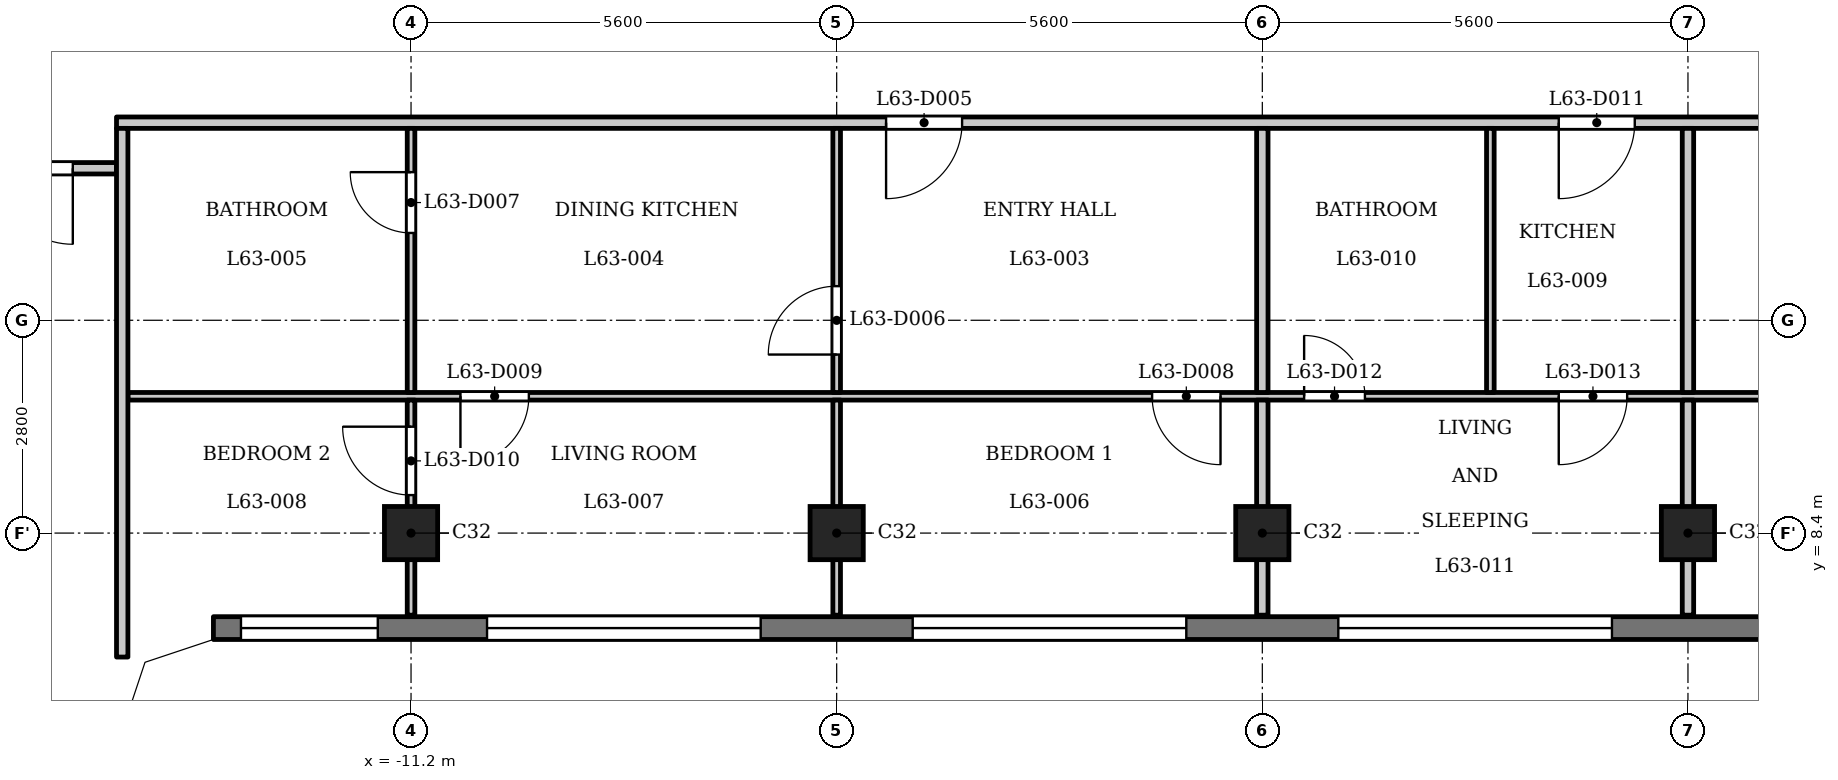
"""IFC4 building model, lengths in metres.
Left out: names, types, materials, properties, quantities, classifications, styles, units other than length and angle.
Written with IfcOpenShell. Run it as: python <this file> out.ifc"""

import sys

from ifc_helpers import new_model, si_unit, direction, frame, frame_2d, origin, origin_2d, place, context, subcontext, project, spatial, polyline, rectangle, outline, extrude, element, fill, save


model = new_model("IFC4")
c1 = context("Model", 3, precision=1e-05, world=origin(), true_north=direction((0.0, 1.0)))
c2 = subcontext(c1, "Body", "Model", "MODEL_VIEW")
j1 = project(units=[si_unit("LENGTHUNIT", "METRE"), si_unit("PLANEANGLEUNIT", "RADIAN")], contexts=[c1])
p1 = place(None, origin())
s1 = spatial("IfcSite", under=j1, at=p1, CompositionType="ELEMENT")
p2 = place(p1, origin())
s2 = spatial("IfcBuilding", under=s1, at=p2, CompositionType="ELEMENT")
p3 = place(p2, frame((0.0, 0.0, 245.2)))
s3 = spatial("IfcBuildingStorey", under=s2, at=p3, CompositionType="ELEMENT", Elevation=245.2)
for number, where, z_axis, x_axis in (
    (1, (-11.2, 8.4, 0.0), (0.0, 0.0, 1.0), (1.0, 0.0, 0.0)),
    (2, (-5.6, 8.4, 0.0), (0.0, 0.0, 1.0), (1.0, 0.0, 0.0)),
    (3, (0.0, 8.4, 0.0), (0.0, 0.0, 1.0), (1.0, 0.0, 0.0)),
    (4, (5.6, 8.4, 0.0), (0.0, 0.0, 1.0), (1.0, 0.0, 0.0)),
):
    element("IfcColumn", number, at=place(p3, frame(where, z_axis=z_axis, x_axis=x_axis)), inside=s3, PredefinedType="COLUMN", context=c2, shape_type="SweptSolid", body=[
        extrude(rectangle(XDim=0.7, YDim=0.7, at=origin_2d()), origin(), (0.0, 0.0, 1.0), 3.5),
    ])
p4 = place(p3, frame((-13.8, 7.15, 0.0), z_axis=(0.0, 0.0, 1.0), x_axis=(1.0, 0.0, 0.0)))
e5 = element("IfcWall", 5, at=p4, inside=s3, PredefinedType="SOLIDWALL", context=c2, shape_type="SweptSolid", body=[
    extrude(rectangle(XDim=27.6, YDim=0.3, at=frame_2d((13.8, 0.0))), origin(), (0.0, 0.0, 1.0), 3.2),
])
p5 = place(p4, frame((0.363, 0.0, 0.9)))
e6 = element("IfcOpeningElement", 6, at=p5, cuts=e5, PredefinedType="OPENING", context=c2, shape_type="SweptSolid", body=[
    extrude(rectangle(XDim=1.8, YDim=1.25, at=frame_2d((0.9, 0.625))), frame((0.0, 0.16, 0.0), z_axis=(0.0, -1.0, 0.0), x_axis=(1.0, 0.0, 0.0)), (0.0, 0.0, 1.0), 0.32),
])
p6 = place(p4, frame((3.6, 0.0, 1.2)))
e7 = element("IfcOpeningElement", 7, at=p6, cuts=e5, PredefinedType="OPENING", context=c2, shape_type="SweptSolid", body=[
    extrude(rectangle(XDim=3.6, YDim=0.95, at=frame_2d((1.8, 0.475))), frame((0.0, 0.16, 0.0), z_axis=(0.0, -1.0, 0.0), x_axis=(1.0, 0.0, 0.0)), (0.0, 0.0, 1.0), 0.32),
])
p7 = place(p4, frame((9.2, 0.0, 1.2)))
e8 = element("IfcOpeningElement", 8, at=p7, cuts=e5, PredefinedType="OPENING", context=c2, shape_type="SweptSolid", body=[
    extrude(rectangle(XDim=3.6, YDim=0.95, at=frame_2d((1.8, 0.475))), frame((0.0, 0.16, 0.0), z_axis=(0.0, -1.0, 0.0), x_axis=(1.0, 0.0, 0.0)), (0.0, 0.0, 1.0), 0.32),
])
p8 = place(p4, frame((14.8, 0.0, 1.2)))
e9 = element("IfcOpeningElement", 9, at=p8, cuts=e5, PredefinedType="OPENING", context=c2, shape_type="SweptSolid", body=[
    extrude(rectangle(XDim=3.6, YDim=0.95, at=frame_2d((1.8, 0.475))), frame((0.0, 0.16, 0.0), z_axis=(0.0, -1.0, 0.0), x_axis=(1.0, 0.0, 0.0)), (0.0, 0.0, 1.0), 0.32),
])
p9 = place(p4, frame((20.4, 0.0, 1.2)))
e10 = element("IfcOpeningElement", 10, at=p9, cuts=e5, PredefinedType="OPENING", context=c2, shape_type="SweptSolid", body=[
    extrude(rectangle(XDim=3.6, YDim=0.95, at=frame_2d((1.8, 0.475))), frame((0.0, 0.16, 0.0), z_axis=(0.0, -1.0, 0.0), x_axis=(1.0, 0.0, 0.0)), (0.0, 0.0, 1.0), 0.32),
])
p10 = place(p4, frame((25.438, 0.0, 0.9)))
e11 = element("IfcOpeningElement", 11, at=p10, cuts=e5, PredefinedType="OPENING", context=c2, shape_type="SweptSolid", body=[
    extrude(rectangle(XDim=1.8, YDim=1.25, at=frame_2d((0.9, 0.625))), frame((0.0, 0.16, 0.0), z_axis=(0.0, -1.0, 0.0), x_axis=(1.0, 0.0, 0.0)), (0.0, 0.0, 1.0), 0.32),
])
p11 = place(p3, frame((-14.925, 10.2, 0.0), z_axis=(0.0, 0.0, 1.0), x_axis=(1.0, 0.0, 0.0)))
e12 = element("IfcWall", 12, at=p11, inside=s3, PredefinedType="PARTITIONING", context=c2, shape_type="SweptSolid", body=[
    extrude(rectangle(XDim=29.85, YDim=0.1, at=frame_2d((14.925, 0.0))), origin(), (0.0, 0.0, 1.0), 3.2),
])
p12 = place(p11, frame((13.475, 0.0, 0.0)))
e13 = element("IfcOpeningElement", 13, at=p12, cuts=e12, PredefinedType="OPENING", context=c2, shape_type="SweptSolid", body=[
    extrude(rectangle(XDim=0.9, YDim=2.1, at=frame_2d((0.45, 1.05))), frame((0.0, 0.06, 0.0), z_axis=(0.0, -1.0, 0.0), x_axis=(1.0, 0.0, 0.0)), (0.0, 0.0, 1.0), 0.12),
])
p13 = place(p11, frame((4.375, 0.0, 0.0)))
e14 = element("IfcOpeningElement", 14, at=p13, cuts=e12, PredefinedType="OPENING", context=c2, shape_type="SweptSolid", body=[
    extrude(rectangle(XDim=0.9, YDim=2.1, at=frame_2d((0.45, 1.05))), frame((0.0, 0.06, 0.0), z_axis=(0.0, -1.0, 0.0), x_axis=(1.0, 0.0, 0.0)), (0.0, 0.0, 1.0), 0.12),
])
p14 = place(p11, frame((15.475, 0.0, 0.0)))
e15 = element("IfcOpeningElement", 15, at=p14, cuts=e12, PredefinedType="OPENING", context=c2, shape_type="SweptSolid", body=[
    extrude(rectangle(XDim=0.8, YDim=2.1, at=frame_2d((0.4, 1.05))), frame((0.0, 0.06, 0.0), z_axis=(0.0, -1.0, 0.0), x_axis=(1.0, 0.0, 0.0)), (0.0, 0.0, 1.0), 0.12),
])
p15 = place(p11, frame((18.825, 0.0, 0.0)))
e16 = element("IfcOpeningElement", 16, at=p15, cuts=e12, PredefinedType="OPENING", context=c2, shape_type="SweptSolid", body=[
    extrude(rectangle(XDim=0.9, YDim=2.1, at=frame_2d((0.45, 1.05))), frame((0.0, 0.06, 0.0), z_axis=(0.0, -1.0, 0.0), x_axis=(1.0, 0.0, 0.0)), (0.0, 0.0, 1.0), 0.12),
])
p16 = place(p11, frame((28.474, 0.0, 0.0)))
e17 = element("IfcOpeningElement", 17, at=p16, cuts=e12, PredefinedType="OPENING", context=c2, shape_type="SweptSolid", body=[
    extrude(rectangle(XDim=0.8, YDim=2.1, at=frame_2d((0.4, 1.05))), frame((0.0, 0.06, 0.0), z_axis=(0.0, -1.0, 0.0), x_axis=(1.0, 0.0, 0.0)), (0.0, 0.0, 1.0), 0.12),
])
p17 = place(p11, frame((24.675, 0.0, 0.0)))
e18 = element("IfcOpeningElement", 18, at=p17, cuts=e12, PredefinedType="OPENING", context=c2, shape_type="SweptSolid", body=[
    extrude(rectangle(XDim=0.9, YDim=2.1, at=frame_2d((0.45, 1.05))), frame((0.0, 0.06, 0.0), z_axis=(0.0, -1.0, 0.0), x_axis=(1.0, 0.0, 0.0)), (0.0, 0.0, 1.0), 0.12),
])
p18 = place(p3, frame((-17.4, 13.2, 0.0), z_axis=(0.0, 0.0, 1.0), x_axis=(1.0, 0.0, 0.0)))
e19 = element("IfcWall", 19, at=p18, inside=s3, PredefinedType="PARTITIONING", context=c2, shape_type="SweptSolid", body=[
    extrude(rectangle(XDim=2.325, YDim=0.15, at=frame_2d((1.163, 0.0))), origin(), (0.0, 0.0, 1.0), 3.2),
])
p19 = place(p18, frame((0.75, 0.0, 0.0)))
e20 = element("IfcOpeningElement", 20, at=p19, cuts=e19, PredefinedType="OPENING", context=c2, shape_type="SweptSolid", body=[
    extrude(rectangle(XDim=1.0, YDim=2.1, at=frame_2d((0.5, 1.05))), frame((0.0, 0.085, 0.0), z_axis=(0.0, -1.0, 0.0), x_axis=(1.0, 0.0, 0.0)), (0.0, 0.0, 1.0), 0.17),
])
p20 = place(p3, frame((-15.075, 13.8, 0.0), z_axis=(0.0, 0.0, 1.0), x_axis=(1.0, 0.0, 0.0)))
e21 = element("IfcWall", 21, at=p20, inside=s3, PredefinedType="PARTITIONING", context=c2, shape_type="SweptSolid", body=[
    extrude(rectangle(XDim=30.15, YDim=0.15, at=frame_2d((15.075, 0.0))), origin(), (0.0, 0.0, 1.0), 3.2),
])
p21 = place(p20, frame((10.125, 0.0, 0.0)))
e22 = element("IfcOpeningElement", 22, at=p21, cuts=e21, PredefinedType="OPENING", context=c2, shape_type="SweptSolid", body=[
    extrude(rectangle(XDim=1.0, YDim=2.1, at=frame_2d((0.5, 1.05))), frame((0.0, 0.085, 0.0), z_axis=(0.0, -1.0, 0.0), x_axis=(1.0, 0.0, 0.0)), (0.0, 0.0, 1.0), 0.17),
])
p22 = place(p20, frame((18.975, 0.0, 0.0)))
e23 = element("IfcOpeningElement", 23, at=p22, cuts=e21, PredefinedType="OPENING", context=c2, shape_type="SweptSolid", body=[
    extrude(rectangle(XDim=1.0, YDim=2.1, at=frame_2d((0.5, 1.05))), frame((0.0, 0.085, 0.0), z_axis=(0.0, -1.0, 0.0), x_axis=(1.0, 0.0, 0.0)), (0.0, 0.0, 1.0), 0.17),
])
p23 = place(p20, frame((24.575, 0.0, 0.0)))
e24 = element("IfcOpeningElement", 24, at=p23, cuts=e21, PredefinedType="OPENING", context=c2, shape_type="SweptSolid", body=[
    extrude(rectangle(XDim=1.0, YDim=2.1, at=frame_2d((0.5, 1.05))), frame((0.0, 0.085, 0.0), z_axis=(0.0, -1.0, 0.0), x_axis=(1.0, 0.0, 0.0)), (0.0, 0.0, 1.0), 0.17),
])
p24 = place(p3, frame((-15.0, 6.769, 0.0), z_axis=(0.0, 0.0, 1.0), x_axis=(0.0, 1.0, 0.0)))
e25 = element("IfcWall", 25, at=p24, inside=s3, PredefinedType="PARTITIONING", context=c2, shape_type="SweptSolid", body=[
    extrude(rectangle(XDim=6.956, YDim=0.15, at=frame_2d((3.478, 0.0))), origin(), (0.0, 0.0, 1.0), 3.2),
])
p25 = place(p3, frame((-11.2, 7.32, 0.0), z_axis=(0.0, 0.0, 1.0), x_axis=(0.0, 1.0, 0.0)))
e26 = element("IfcWall", 26, at=p25, inside=s3, PredefinedType="PARTITIONING", context=c2, shape_type="SweptSolid", body=[
    extrude(rectangle(XDim=2.83, YDim=0.1, at=frame_2d((1.415, 0.0))), origin(), (0.0, 0.0, 1.0), 3.2),
])
p26 = place(p25, frame((1.58, 0.0, 0.0)))
e27 = element("IfcOpeningElement", 27, at=p26, cuts=e26, PredefinedType="OPENING", context=c2, shape_type="SweptSolid", body=[
    extrude(rectangle(XDim=0.9, YDim=2.1, at=frame_2d((0.45, 1.05))), frame((0.0, 0.06, 0.0), z_axis=(0.0, -1.0, 0.0), x_axis=(1.0, 0.0, 0.0)), (0.0, 0.0, 1.0), 0.12),
])
p27 = place(p3, frame((-11.2, 10.25, 0.0), z_axis=(0.0, 0.0, 1.0), x_axis=(0.0, 1.0, 0.0)))
e28 = element("IfcWall", 28, at=p27, inside=s3, PredefinedType="PARTITIONING", context=c2, shape_type="SweptSolid", body=[
    extrude(rectangle(XDim=3.475, YDim=0.1, at=frame_2d((1.738, 0.0))), origin(), (0.0, 0.0, 1.0), 3.2),
])
p28 = place(p27, frame((2.099, 0.0, 0.0)))
e29 = element("IfcOpeningElement", 29, at=p28, cuts=e28, PredefinedType="OPENING", context=c2, shape_type="SweptSolid", body=[
    extrude(rectangle(XDim=0.8, YDim=2.1, at=frame_2d((0.4, 1.05))), frame((0.0, 0.06, 0.0), z_axis=(0.0, -1.0, 0.0), x_axis=(1.0, 0.0, 0.0)), (0.0, 0.0, 1.0), 0.12),
])
p29 = place(p3, frame((-5.6, 7.32, 0.0), z_axis=(0.0, 0.0, 1.0), x_axis=(0.0, 1.0, 0.0)))
e30 = element("IfcWall", 30, at=p29, inside=s3, PredefinedType="PARTITIONING", context=c2, shape_type="SweptSolid", body=[
    extrude(rectangle(XDim=2.83, YDim=0.1, at=frame_2d((1.415, 0.0))), origin(), (0.0, 0.0, 1.0), 3.2),
])
p30 = place(p3, frame((-5.6, 10.25, 0.0), z_axis=(0.0, 0.0, 1.0), x_axis=(0.0, 1.0, 0.0)))
e31 = element("IfcWall", 31, at=p30, inside=s3, PredefinedType="PARTITIONING", context=c2, shape_type="SweptSolid", body=[
    extrude(rectangle(XDim=3.475, YDim=0.1, at=frame_2d((1.738, 0.0))), origin(), (0.0, 0.0, 1.0), 3.2),
])
p31 = place(p30, frame((0.499, 0.0, 0.0)))
e32 = element("IfcOpeningElement", 32, at=p31, cuts=e31, PredefinedType="OPENING", context=c2, shape_type="SweptSolid", body=[
    extrude(rectangle(XDim=0.9, YDim=2.1, at=frame_2d((0.45, 1.05))), frame((0.0, 0.06, 0.0), z_axis=(0.0, -1.0, 0.0), x_axis=(1.0, 0.0, 0.0)), (0.0, 0.0, 1.0), 0.12),
])
p32 = place(p3, frame((0.0, 7.32, 0.0), z_axis=(0.0, 0.0, 1.0), x_axis=(0.0, 1.0, 0.0)))
e33 = element("IfcWall", 33, at=p32, inside=s3, PredefinedType="PARTITIONING", context=c2, shape_type="SweptSolid", body=[
    extrude(rectangle(XDim=2.83, YDim=0.15, at=frame_2d((1.415, 0.0))), origin(), (0.0, 0.0, 1.0), 3.2),
])
p33 = place(p3, frame((0.0, 10.25, 0.0), z_axis=(0.0, 0.0, 1.0), x_axis=(0.0, 1.0, 0.0)))
e34 = element("IfcWall", 34, at=p33, inside=s3, PredefinedType="PARTITIONING", context=c2, shape_type="SweptSolid", body=[
    extrude(rectangle(XDim=3.475, YDim=0.15, at=frame_2d((1.738, 0.0))), origin(), (0.0, 0.0, 1.0), 3.2),
])
p34 = place(p3, frame((3.0, 10.25, 0.0), z_axis=(0.0, 0.0, 1.0), x_axis=(0.0, 1.0, 0.0)))
e35 = element("IfcWall", 35, at=p34, inside=s3, PredefinedType="PARTITIONING", context=c2, shape_type="SweptSolid", body=[
    extrude(rectangle(XDim=3.475, YDim=0.1, at=frame_2d((1.738, 0.0))), origin(), (0.0, 0.0, 1.0), 3.2),
])
p35 = place(p3, frame((5.6, 7.32, 0.0), z_axis=(0.0, 0.0, 1.0), x_axis=(0.0, 1.0, 0.0)))
e36 = element("IfcWall", 36, at=p35, inside=s3, PredefinedType="PARTITIONING", context=c2, shape_type="SweptSolid", body=[
    extrude(rectangle(XDim=2.83, YDim=0.15, at=frame_2d((1.415, 0.0))), origin(), (0.0, 0.0, 1.0), 3.2),
])
p36 = place(p3, frame((5.6, 10.25, 0.0), z_axis=(0.0, 0.0, 1.0), x_axis=(0.0, 1.0, 0.0)))
e37 = element("IfcWall", 37, at=p36, inside=s3, PredefinedType="PARTITIONING", context=c2, shape_type="SweptSolid", body=[
    extrude(rectangle(XDim=3.475, YDim=0.15, at=frame_2d((1.738, 0.0))), origin(), (0.0, 0.0, 1.0), 3.2),
])
p37 = place(p3, origin())
e38 = element("IfcWall", 38, at=p37, inside=s3, PredefinedType="SOLIDWALL", context=c2, shape_type="SweptSolid", body=[
    extrude(outline(polyline([(-13.849, 7.3), (-14.937, 6.937), (-15.3, 5.849), (-15.3, 5.8), (-15.0, 5.8), (-14.7, 6.7), (-13.8, 7.0), (-13.8, 7.3), (-13.849, 7.3)])), origin(), (0.0, 0.0, 1.0), 3.2),
])
p38 = place(p19, origin())
e39 = element("IfcDoor", 39, at=p38, inside=s3, OperationType="SINGLE_SWING_RIGHT", PredefinedType="DOOR", context=c2, shape_type="SweptSolid", body=[
    extrude(rectangle(XDim=1.0, YDim=2.1, at=frame_2d((0.5, 1.05))), frame((0.0, 0.025, 0.0), z_axis=(0.0, -1.0, 0.0), x_axis=(1.0, 0.0, 0.0)), (0.0, 0.0, 1.0), 0.05),
])
fill(e20, e39)
p39 = place(p21, origin())
e40 = element("IfcDoor", 40, at=p39, inside=s3, OperationType="SINGLE_SWING_LEFT", PredefinedType="DOOR", context=c2, shape_type="SweptSolid", body=[
    extrude(rectangle(XDim=1.0, YDim=2.1, at=frame_2d((0.5, 1.05))), frame((0.0, 0.025, 0.0), z_axis=(0.0, -1.0, 0.0), x_axis=(1.0, 0.0, 0.0)), (0.0, 0.0, 1.0), 0.05),
])
fill(e22, e40)
p40 = place(p31, origin())
e41 = element("IfcDoor", 41, at=p40, inside=s3, OperationType="SINGLE_SWING_RIGHT", PredefinedType="DOOR", context=c2, shape_type="SweptSolid", body=[
    extrude(rectangle(XDim=0.9, YDim=2.1, at=frame_2d((0.45, 1.05))), frame((0.0, 0.025, 0.0), z_axis=(0.0, -1.0, 0.0), x_axis=(1.0, 0.0, 0.0)), (0.0, 0.0, 1.0), 0.05),
])
fill(e32, e41)
p41 = place(p28, origin())
e42 = element("IfcDoor", 42, at=p41, inside=s3, OperationType="SINGLE_SWING_LEFT", PredefinedType="DOOR", context=c2, shape_type="SweptSolid", body=[
    extrude(rectangle(XDim=0.8, YDim=2.1, at=frame_2d((0.4, 1.05))), frame((0.0, 0.025, 0.0), z_axis=(0.0, -1.0, 0.0), x_axis=(1.0, 0.0, 0.0)), (0.0, 0.0, 1.0), 0.05),
])
fill(e29, e42)
p42 = place(p12, origin())
e43 = element("IfcDoor", 43, at=p42, inside=s3, OperationType="SINGLE_SWING_RIGHT", PredefinedType="DOOR", context=c2, shape_type="SweptSolid", body=[
    extrude(rectangle(XDim=0.9, YDim=2.1, at=frame_2d((0.45, 1.05))), frame((0.0, 0.025, 0.0), z_axis=(0.0, -1.0, 0.0), x_axis=(1.0, 0.0, 0.0)), (0.0, 0.0, 1.0), 0.05),
])
fill(e13, e43)
p43 = place(p13, origin())
e44 = element("IfcDoor", 44, at=p43, inside=s3, OperationType="SINGLE_SWING_LEFT", PredefinedType="DOOR", context=c2, shape_type="SweptSolid", body=[
    extrude(rectangle(XDim=0.9, YDim=2.1, at=frame_2d((0.45, 1.05))), frame((0.0, 0.025, 0.0), z_axis=(0.0, -1.0, 0.0), x_axis=(1.0, 0.0, 0.0)), (0.0, 0.0, 1.0), 0.05),
])
fill(e14, e44)
p44 = place(p26, origin())
e45 = element("IfcDoor", 45, at=p44, inside=s3, OperationType="SINGLE_SWING_LEFT", PredefinedType="DOOR", context=c2, shape_type="SweptSolid", body=[
    extrude(rectangle(XDim=0.9, YDim=2.1, at=frame_2d((0.45, 1.05))), frame((0.0, 0.025, 0.0), z_axis=(0.0, -1.0, 0.0), x_axis=(1.0, 0.0, 0.0)), (0.0, 0.0, 1.0), 0.05),
])
fill(e27, e45)
p45 = place(p22, origin())
e46 = element("IfcDoor", 46, at=p45, inside=s3, OperationType="SINGLE_SWING_LEFT", PredefinedType="DOOR", context=c2, shape_type="SweptSolid", body=[
    extrude(rectangle(XDim=1.0, YDim=2.1, at=frame_2d((0.5, 1.05))), frame((0.0, 0.025, 0.0), z_axis=(0.0, -1.0, 0.0), x_axis=(1.0, 0.0, 0.0)), (0.0, 0.0, 1.0), 0.05),
])
fill(e23, e46)
p46 = place(p14, origin())
e47 = element("IfcDoor", 47, at=p46, inside=s3, OperationType="SINGLE_SWING_RIGHT", PredefinedType="DOOR", context=c2, shape_type="SweptSolid", body=[
    extrude(rectangle(XDim=0.8, YDim=2.1, at=frame_2d((0.4, 1.05))), frame((0.0, 0.025, 0.0), z_axis=(0.0, -1.0, 0.0), x_axis=(1.0, 0.0, 0.0)), (0.0, 0.0, 1.0), 0.05),
])
fill(e15, e47)
p47 = place(p15, origin())
e48 = element("IfcDoor", 48, at=p47, inside=s3, OperationType="SINGLE_SWING_LEFT", PredefinedType="DOOR", context=c2, shape_type="SweptSolid", body=[
    extrude(rectangle(XDim=0.9, YDim=2.1, at=frame_2d((0.45, 1.05))), frame((0.0, 0.025, 0.0), z_axis=(0.0, -1.0, 0.0), x_axis=(1.0, 0.0, 0.0)), (0.0, 0.0, 1.0), 0.05),
])
fill(e16, e48)
p48 = place(p5, origin())
e49 = element("IfcWindow", 49, at=p48, inside=s3, PartitioningType="SINGLE_PANEL", PredefinedType="WINDOW", context=c2, shape_type="SweptSolid", body=[
    extrude(rectangle(XDim=1.8, YDim=1.25, at=frame_2d((0.9, 0.625))), frame((0.0, 0.03, 0.0), z_axis=(0.0, -1.0, 0.0), x_axis=(1.0, 0.0, 0.0)), (0.0, 0.0, 1.0), 0.06),
])
fill(e6, e49)
p49 = place(p6, origin())
e50 = element("IfcWindow", 50, at=p49, inside=s3, PartitioningType="SINGLE_PANEL", PredefinedType="WINDOW", context=c2, shape_type="SweptSolid", body=[
    extrude(rectangle(XDim=3.6, YDim=0.95, at=frame_2d((1.8, 0.475))), frame((0.0, 0.03, 0.0), z_axis=(0.0, -1.0, 0.0), x_axis=(1.0, 0.0, 0.0)), (0.0, 0.0, 1.0), 0.06),
])
fill(e7, e50)
p50 = place(p7, origin())
e51 = element("IfcWindow", 51, at=p50, inside=s3, PartitioningType="SINGLE_PANEL", PredefinedType="WINDOW", context=c2, shape_type="SweptSolid", body=[
    extrude(rectangle(XDim=3.6, YDim=0.95, at=frame_2d((1.8, 0.475))), frame((0.0, 0.03, 0.0), z_axis=(0.0, -1.0, 0.0), x_axis=(1.0, 0.0, 0.0)), (0.0, 0.0, 1.0), 0.06),
])
fill(e8, e51)
p51 = place(p8, origin())
e52 = element("IfcWindow", 52, at=p51, inside=s3, PartitioningType="SINGLE_PANEL", PredefinedType="WINDOW", context=c2, shape_type="SweptSolid", body=[
    extrude(rectangle(XDim=3.6, YDim=0.95, at=frame_2d((1.8, 0.475))), frame((0.0, 0.03, 0.0), z_axis=(0.0, -1.0, 0.0), x_axis=(1.0, 0.0, 0.0)), (0.0, 0.0, 1.0), 0.06),
])
fill(e9, e52)
save(model, sys.argv[1])
